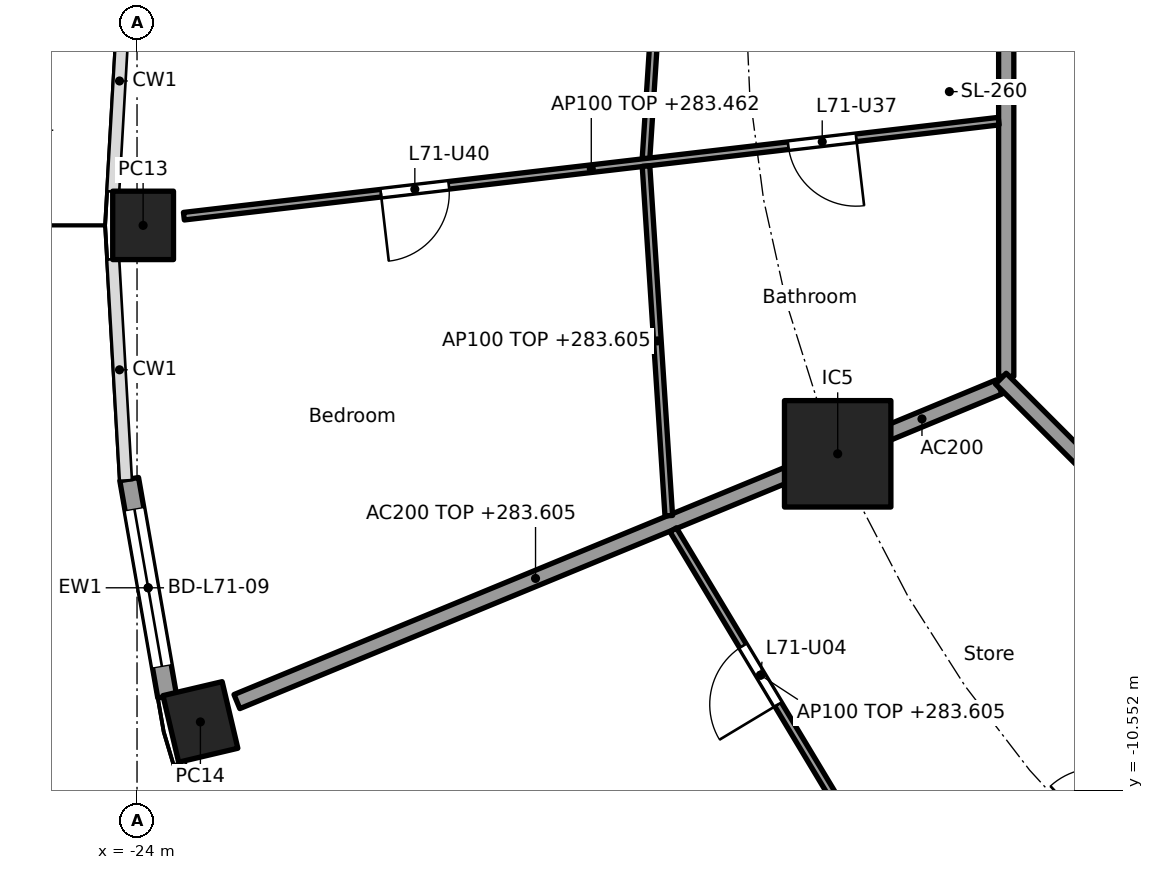
"""IFC4 building model, lengths in metres.
Left out: names, types, materials, properties, quantities, classifications, styles, units other than length and angle.
Written with IfcOpenShell. Run it as: python <this file> out.ifc"""

import sys

from ifc_helpers import new_model, si_unit, direction, frame, frame_2d, origin, origin_2d, place, context, subcontext, project, spatial, rectangle, hollow_rectangle, extrude, element, fill, save


model = new_model("IFC4")
c1 = context("Model", 3, precision=1e-05, world=origin(), true_north=direction((0.0, 1.0)))
c2 = subcontext(c1, "Body", "Model", "MODEL_VIEW")
j1 = project(units=[si_unit("LENGTHUNIT", "METRE"), si_unit("PLANEANGLEUNIT", "RADIAN")], contexts=[c1])
p1 = place(None, origin())
s1 = spatial("IfcSite", under=j1, at=p1, CompositionType="ELEMENT")
p2 = place(p1, origin())
s2 = spatial("IfcBuilding", under=s1, at=p2, CompositionType="ELEMENT")
p3 = place(p2, frame((0.0, 0.0, 280.7)))
s3 = spatial("IfcBuildingStorey", under=s2, at=p3, CompositionType="ELEMENT", Elevation=280.7)
for number, where, z_axis, x_axis in (
    (1, (-23.92, -3.118, 0.0), (0.0, 0.0, 1.0), (0.0, -1.0, 0.0)),
    (2, (-23.166, -9.65, 0.0), (0.0, 0.0, 1.0), (0.229, -0.973, 0.0)),
):
    element("IfcColumn", number, at=place(p3, frame(where, z_axis=z_axis, x_axis=x_axis)), inside=s3, PredefinedType="COLUMN", context=c2, shape_type="SweptSolid", body=[
        extrude(hollow_rectangle(XDim=0.9, YDim=0.8, WallThickness=0.028, at=origin_2d()), origin(), (0.0, 0.0, 1.0), 3.7),
    ])
p4 = place(p3, frame((-14.782, -6.123, 0.0), z_axis=(0.0, 0.0, 1.0), x_axis=(1.0, 0.0, 0.0)))
e3 = element("IfcColumn", 3, at=p4, inside=s3, PredefinedType="COLUMN", context=c2, shape_type="SweptSolid", body=[
    extrude(rectangle(XDim=1.4, YDim=1.4, at=origin_2d()), origin(), (0.0, 0.0, 1.0), 3.7),
])
p5 = place(p3, frame((-23.604, -9.315, 0.0), z_axis=(0.0, 0.0, 1.0), x_axis=(-0.172182411767, 0.985065082661, 0.0)))
e4 = element("IfcWall", 4, at=p5, inside=s3, PredefinedType="SOLIDWALL", context=c2, shape_type="SweptSolid", body=[
    extrude(rectangle(XDim=2.903, YDim=0.25, at=frame_2d((1.451, 0.0))), origin(), (0.0, 0.0, 1.0), 3.44),
])
p6 = place(p5, frame((0.401, 0.0, 0.0)))
e5 = element("IfcOpeningElement", 5, at=p6, cuts=e4, PredefinedType="OPENING", context=c2, shape_type="SweptSolid", body=[
    extrude(rectangle(XDim=2.1, YDim=2.4, at=frame_2d((1.05, 1.2))), frame((0.0, 0.135, 0.0), z_axis=(0.0, -1.0, 0.0), x_axis=(1.0, 0.0, 0.0)), (0.0, 0.0, 1.0), 0.27),
])
p7 = place(p3, frame((-12.657, -5.243, 0.0), z_axis=(0.0, 0.0, 1.0), x_axis=(-0.923859888513, -0.38273085373, 0.0)))
e6 = element("IfcWall", 6, at=p7, inside=s3, PredefinedType="PARTITIONING", context=c2, shape_type="SweptSolid", body=[
    extrude(rectangle(XDim=2.199, YDim=0.2, at=frame_2d((1.1, 0.0))), origin(), (0.0, 0.0, 1.0), 3.44),
])
p8 = place(p3, frame((-14.828, -6.142, 0.0), z_axis=(0.0, 0.0, 1.0), x_axis=(-0.924478087429, -0.381235184451, 0.0)))
e7 = element("IfcWall", 7, at=p8, inside=s3, PredefinedType="PARTITIONING", context=c2, shape_type="SweptSolid", body=[
    extrude(rectangle(XDim=8.499, YDim=0.2, at=frame_2d((4.25, 0.0))), origin(), (0.0, 0.0, 1.0), 2.905),
])
p9 = place(p3, frame((-12.565, 5.304, 0.0), z_axis=(0.0, 0.0, 1.0), x_axis=(0.0, -1.0, 0.0)))
e8 = element("IfcWall", 8, at=p9, inside=s3, PredefinedType="PARTITIONING", context=c2, shape_type="SweptSolid", body=[
    extrude(rectangle(XDim=10.409, YDim=0.2, at=frame_2d((5.205, 0.0))), origin(), (0.0, 0.0, 1.0), 3.44),
])
p10 = place(p9, frame((4.804, 0.0, 0.0)))
e9 = element("IfcOpeningElement", 9, at=p10, cuts=e8, PredefinedType="OPENING", context=c2, shape_type="SweptSolid", body=[
    extrude(rectangle(XDim=1.0, YDim=2.1, at=frame_2d((0.5, 1.05))), frame((0.0, 0.11, 0.0), z_axis=(0.0, -1.0, 0.0), x_axis=(1.0, 0.0, 0.0)), (0.0, 0.0, 1.0), 0.22),
])
p11 = place(p3, frame((-12.635, -5.134, 0.0), z_axis=(0.0, 0.0, 1.0), x_axis=(0.707106781187, -0.707106781187, 0.0)))
e10 = element("IfcWall", 10, at=p11, inside=s3, PredefinedType="PARTITIONING", context=c2, shape_type="SweptSolid", body=[
    extrude(rectangle(XDim=10.609, YDim=0.2, at=frame_2d((5.305, 0.0))), origin(), (0.0, 0.0, 1.0), 3.44),
])
p12 = place(p11, frame((6.539, 0.0, 0.0)))
e11 = element("IfcOpeningElement", 11, at=p12, cuts=e10, PredefinedType="OPENING", context=c2, shape_type="SweptSolid", body=[
    extrude(rectangle(XDim=1.0, YDim=2.1, at=frame_2d((0.5, 1.05))), frame((0.0, 0.11, 0.0), z_axis=(0.0, -1.0, 0.0), x_axis=(1.0, 0.0, 0.0)), (0.0, 0.0, 1.0), 0.22),
])
p13 = place(p3, frame((-17.002, 2.409, 0.0), z_axis=(0.0, 0.0, 1.0), x_axis=(-0.064855550758, -0.997894662545, 0.0)))
e12 = element("IfcWall", 12, at=p13, inside=s3, PredefinedType="PARTITIONING", context=c2, shape_type="SweptSolid", body=[
    extrude(rectangle(XDim=4.656, YDim=0.1, at=frame_2d((2.328, 0.0))), origin(), (0.0, 0.0, 1.0), 2.905),
])
p14 = place(p3, frame((-12.664, -1.746, 0.0), z_axis=(0.0, 0.0, 1.0), x_axis=(-0.993264397529, -0.115869912409, 0.0)))
e13 = element("IfcWall", 13, at=p14, inside=s3, PredefinedType="PARTITIONING", context=c2, shape_type="SweptSolid", body=[
    extrude(rectangle(XDim=10.792, YDim=0.1, at=frame_2d((5.396, 0.0))), origin(), (0.0, 0.0, 1.0), 2.762),
])
p15 = place(p14, frame((1.887, 0.0, 0.0)))
e14 = element("IfcOpeningElement", 14, at=p15, cuts=e13, PredefinedType="OPENING", context=c2, shape_type="SweptSolid", body=[
    extrude(rectangle(XDim=0.9, YDim=2.1, at=frame_2d((0.45, 1.05))), frame((0.0, 0.06, 0.0), z_axis=(0.0, -1.0, 0.0), x_axis=(1.0, 0.0, 0.0)), (0.0, 0.0, 1.0), 0.12),
])
p16 = place(p14, frame((7.283, 0.0, 0.0)))
e15 = element("IfcOpeningElement", 15, at=p16, cuts=e13, PredefinedType="OPENING", context=c2, shape_type="SweptSolid", body=[
    extrude(rectangle(XDim=0.9, YDim=2.1, at=frame_2d((0.45, 1.05))), frame((0.0, 0.06, 0.0), z_axis=(0.0, -1.0, 0.0), x_axis=(1.0, 0.0, 0.0)), (0.0, 0.0, 1.0), 0.12),
])
p17 = place(p3, frame((-17.304, -2.338, 0.0), z_axis=(0.0, 0.0, 1.0), x_axis=(0.06500001157, -0.997885263192, 0.0)))
e16 = element("IfcWall", 16, at=p17, inside=s3, PredefinedType="PARTITIONING", context=c2, shape_type="SweptSolid", body=[
    extrude(rectangle(XDim=4.609, YDim=0.1, at=frame_2d((2.304, 0.0))), origin(), (0.0, 0.0, 1.0), 2.905),
])
p18 = place(p3, frame((-16.946, -7.122, 0.0), z_axis=(0.0, 0.0, 1.0), x_axis=(0.514994556856, -0.857193447483, 0.0)))
e17 = element("IfcWall", 17, at=p18, inside=s3, PredefinedType="PARTITIONING", context=c2, shape_type="SweptSolid", body=[
    extrude(rectangle(XDim=4.462, YDim=0.1, at=frame_2d((2.231, 0.0))), origin(), (0.0, 0.0, 1.0), 2.905),
])
p19 = place(p18, frame((1.781, 0.0, 0.0)))
e18 = element("IfcOpeningElement", 18, at=p19, cuts=e17, PredefinedType="OPENING", context=c2, shape_type="SweptSolid", body=[
    extrude(rectangle(XDim=0.9, YDim=2.1, at=frame_2d((0.45, 1.05))), frame((0.0, 0.06, 0.0), z_axis=(0.0, -1.0, 0.0), x_axis=(1.0, 0.0, 0.0)), (0.0, 0.0, 1.0), 0.12),
])
p20 = place(p3, frame((-8.958, -8.952, 0.0), z_axis=(0.0, 0.0, 1.0), x_axis=(-0.73876526954, -0.673962815385, 0.0)))
e19 = element("IfcWall", 19, at=p20, inside=s3, PredefinedType="PARTITIONING", context=c2, shape_type="SweptSolid", body=[
    extrude(rectangle(XDim=5.647, YDim=0.1, at=frame_2d((2.824, 0.0))), origin(), (0.0, 0.0, 1.0), 2.762),
])
p21 = place(p20, frame((2.374, 0.0, 0.0)))
e20 = element("IfcOpeningElement", 20, at=p21, cuts=e19, PredefinedType="OPENING", context=c2, shape_type="SweptSolid", body=[
    extrude(rectangle(XDim=0.9, YDim=2.1, at=frame_2d((0.45, 1.05))), frame((0.0, 0.06, 0.0), z_axis=(0.0, -1.0, 0.0), x_axis=(1.0, 0.0, 0.0)), (0.0, 0.0, 1.0), 0.12),
])
p22 = place(p6, origin())
e21 = element("IfcDoor", 21, at=p22, inside=s3, OperationType="SLIDING_TO_LEFT", PredefinedType="DOOR", context=c2, shape_type="SweptSolid", body=[
    extrude(rectangle(XDim=2.1, YDim=2.4, at=frame_2d((1.05, 1.2))), frame((0.0, 0.025, 0.0), z_axis=(0.0, -1.0, 0.0), x_axis=(1.0, 0.0, 0.0)), (0.0, 0.0, 1.0), 0.05),
])
fill(e5, e21)
p23 = place(p19, frame((0.9, 0.0, 0.0), x_axis=(-1.0, 0.0, 0.0)))
e22 = element("IfcDoor", 22, at=p23, inside=s3, OperationType="SINGLE_SWING_LEFT", PredefinedType="DOOR", context=c2, shape_type="SweptSolid", body=[
    extrude(rectangle(XDim=0.9, YDim=2.1, at=frame_2d((0.45, 1.05))), frame((0.0, 0.025, 0.0), z_axis=(0.0, -1.0, 0.0), x_axis=(1.0, 0.0, 0.0)), (0.0, 0.0, 1.0), 0.05),
])
fill(e18, e22)
p24 = place(p15, origin())
e23 = element("IfcDoor", 23, at=p24, inside=s3, OperationType="SINGLE_SWING_LEFT", PredefinedType="DOOR", context=c2, shape_type="SweptSolid", body=[
    extrude(rectangle(XDim=0.9, YDim=2.1, at=frame_2d((0.45, 1.05))), frame((0.0, 0.025, 0.0), z_axis=(0.0, -1.0, 0.0), x_axis=(1.0, 0.0, 0.0)), (0.0, 0.0, 1.0), 0.05),
])
fill(e14, e23)
p25 = place(p16, origin())
e24 = element("IfcDoor", 24, at=p25, inside=s3, OperationType="SINGLE_SWING_RIGHT", PredefinedType="DOOR", context=c2, shape_type="SweptSolid", body=[
    extrude(rectangle(XDim=0.9, YDim=2.1, at=frame_2d((0.45, 1.05))), frame((0.0, 0.025, 0.0), z_axis=(0.0, -1.0, 0.0), x_axis=(1.0, 0.0, 0.0)), (0.0, 0.0, 1.0), 0.05),
])
fill(e15, e24)
save(model, sys.argv[1])
